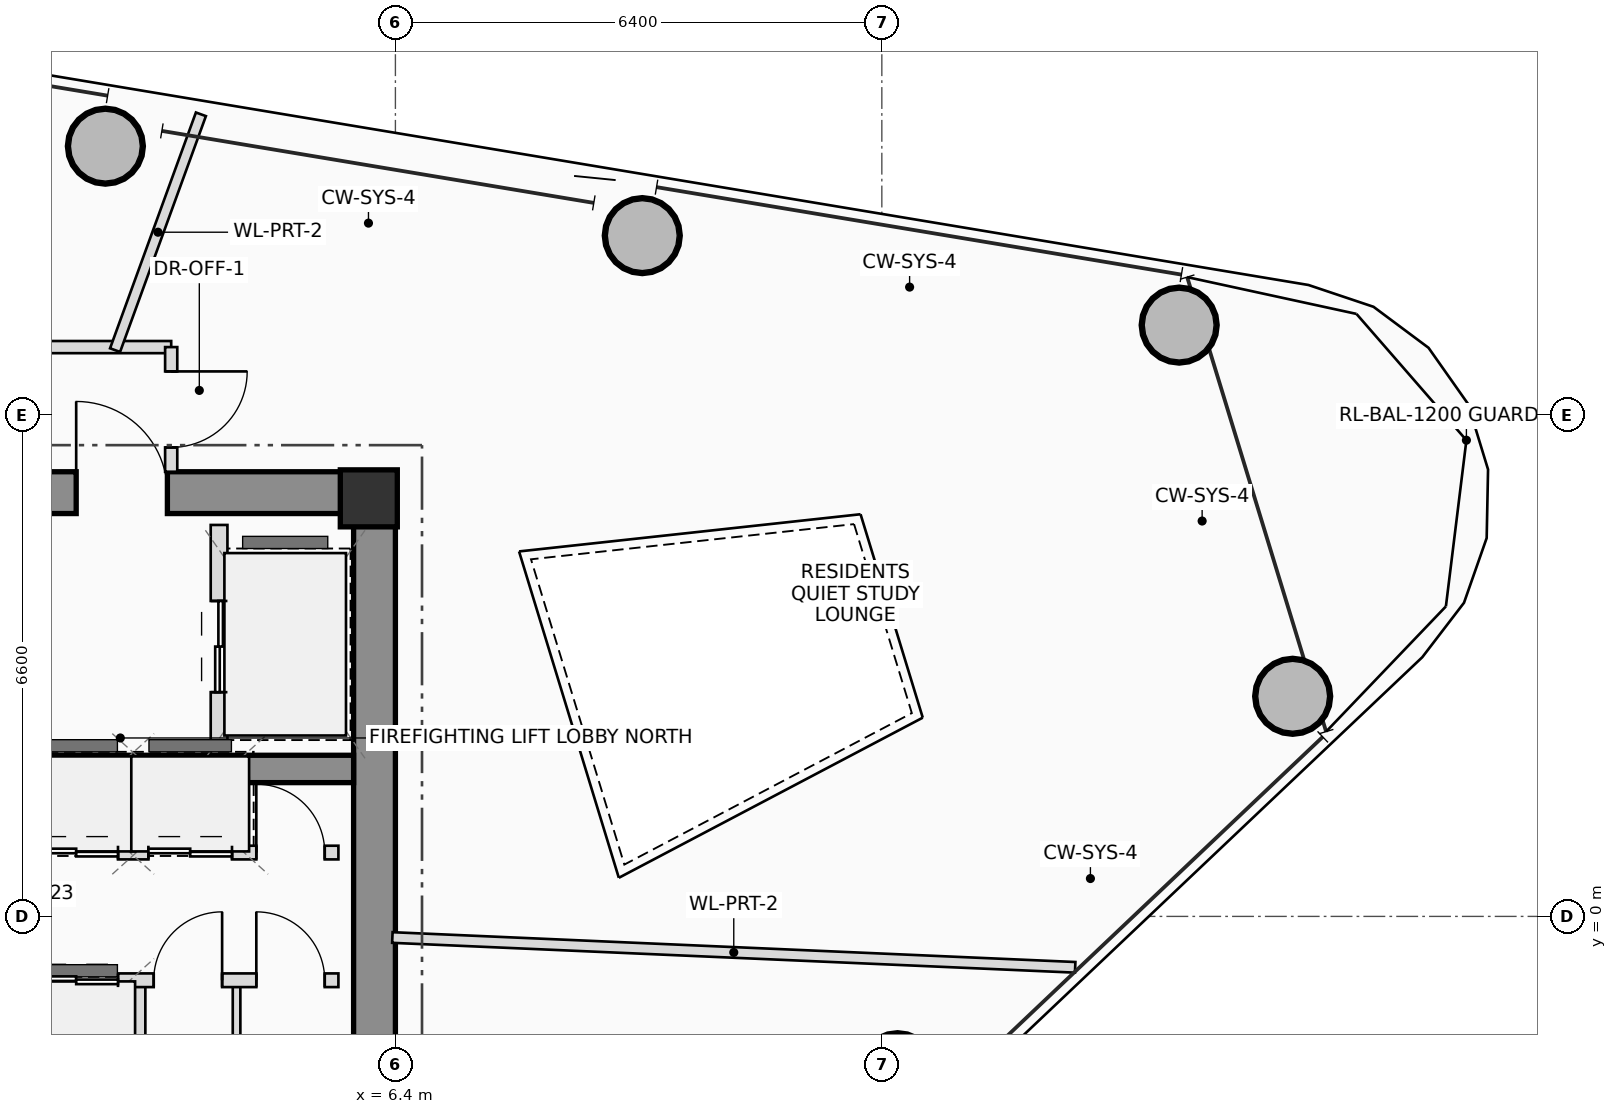
"""IFC4 building model, lengths in metres.
Left out: names, types, materials, properties, quantities, classifications, styles, units other than length and angle.
Written with IfcOpenShell. Run it as: python <this file> out.ifc"""

import sys

from ifc_helpers import new_model, si_unit, direction, frame, frame_2d, origin, origin_2d, place, context, subcontext, project, spatial, rectangle, hollow_circle, extrude, source, transform, mapped, element, fill, save


model = new_model("IFC4")
c1 = context("Model", 3, precision=1e-05, world=origin(), true_north=direction((0.0, 1.0)))
c2 = subcontext(c1, "Body", "Model", "MODEL_VIEW")
j1 = project(units=[si_unit("LENGTHUNIT", "METRE"), si_unit("PLANEANGLEUNIT", "RADIAN")], contexts=[c1])
p1 = place(None, origin())
s1 = spatial("IfcSite", under=j1, at=p1, CompositionType="ELEMENT")
p2 = place(p1, origin())
s2 = spatial("IfcBuilding", under=s1, at=p2, CompositionType="ELEMENT")
p3 = place(p2, frame((0.0, 0.0, 245.65)))
s3 = spatial("IfcBuildingStorey", under=s2, at=p3, CompositionType="ELEMENT", Elevation=245.65)
m1 = source(origin(), c2, "Body", "SweptSolid", [
    extrude(rectangle(XDim=0.75, YDim=0.75, at=origin_2d()), origin(), (0.0, 0.0, 1.0), 3.4),
])
p4 = place(p3, frame((6.05, 5.5, 0.0), z_axis=(0.0, 0.0, 1.0), x_axis=(1.0, 0.0, 0.0)))
e1 = element("IfcColumn", 1, at=p4, inside=s3, PredefinedType="COLUMN", context=c2, shape_type="MappedRepresentation", body=[
    mapped(m1, transform((0.0, 0.0, 0.0), scale=1.0)),
])
p5 = place(p3, frame((-6.4, 5.575, 0.0), z_axis=(0.0, 0.0, 1.0), x_axis=(1.0, 0.0, 0.0)))
e2 = element("IfcWall", 2, at=p5, inside=s3, PredefinedType="SHEAR", context=c2, shape_type="SweptSolid", body=[
    extrude(rectangle(XDim=12.8, YDim=0.55, at=frame_2d((6.4, 0.0))), origin(), (0.0, 0.0, 1.0), 3.4),
])
p6 = place(p5, frame((8.6, 0.0, 0.0)))
e3 = element("IfcOpeningElement", 3, at=p6, cuts=e2, PredefinedType="OPENING", context=c2, shape_type="SweptSolid", body=[
    extrude(rectangle(XDim=1.2, YDim=2.2, at=frame_2d((0.6, 1.1))), frame((0.0, 0.285, 0.0), z_axis=(0.0, -1.0, 0.0), x_axis=(1.0, 0.0, 0.0)), (0.0, 0.0, 1.0), 0.57),
])
p7 = place(p3, frame((6.125, -5.3, 0.0), z_axis=(0.0, 0.0, 1.0), x_axis=(0.0, 1.0, 0.0)))
e4 = element("IfcWall", 4, at=p7, inside=s3, PredefinedType="SHEAR", context=c2, shape_type="SweptSolid", body=[
    extrude(rectangle(XDim=10.6, YDim=0.55, at=frame_2d((5.3, 0.0))), origin(), (0.0, 0.0, 1.0), 3.4),
])
p8 = place(p3, frame((-5.85, 1.94, 0.0), z_axis=(0.0, 0.0, 1.0), x_axis=(1.0, 0.0, 0.0)))
e5 = element("IfcWall", 5, at=p8, inside=s3, PredefinedType="SHEAR", context=c2, shape_type="SweptSolid", body=[
    extrude(rectangle(XDim=11.7, YDim=0.36, at=frame_2d((5.85, 0.0))), origin(), (0.0, 0.0, 1.0), 3.4),
])
m2 = source(origin(), c2, "Body", "SweptSolid", [
    extrude(hollow_circle(Radius=0.5, WallThickness=0.04, at=origin_2d()), origin(), (0.0, 0.0, 1.0), 3.4),
])
for number, where, z_axis, x_axis in (
    (6, (13.007, -2.03, 0.0), (0.0, 0.0, 1.0), (1.0, 0.0, 0.0)),
    (7, (18.205, 2.896, 0.0), (0.0, 0.0, 1.0), (1.0, 0.0, 0.0)),
    (8, (16.712, 7.779, 0.0), (0.0, 0.0, 1.0), (1.0, 0.0, 0.0)),
    (9, (9.648, 8.957, 0.0), (0.0, 0.0, 1.0), (1.0, 0.0, 0.0)),
    (10, (2.584, 10.134, 0.0), (0.0, 0.0, 1.0), (1.0, 0.0, 0.0)),
):
    element("IfcColumn", number, at=place(p3, frame(where, z_axis=z_axis, x_axis=x_axis)), inside=s3, PredefinedType="COLUMN", context=c2, shape_type="MappedRepresentation", body=[
        mapped(m2, transform((0.0, 0.0, 0.0), scale=1.0)),
    ])
p9 = place(p3, frame((4.08, 2.2, 0.0), z_axis=(0.0, 0.0, 1.0), x_axis=(0.0, 1.0, 0.0)))
e11 = element("IfcWall", 11, at=p9, inside=s3, PredefinedType="PLUMBINGWALL", context=c2, shape_type="SweptSolid", body=[
    extrude(rectangle(XDim=2.95, YDim=0.22, at=frame_2d((1.475, 0.0))), origin(), (0.0, 0.0, 1.0), 3.2),
])
p10 = place(p9, frame((0.75, 0.0, 0.0)))
e12 = element("IfcOpeningElement", 12, at=p10, cuts=e11, PredefinedType="OPENING", context=c2, shape_type="SweptSolid", body=[
    extrude(rectangle(XDim=1.2, YDim=2.25, at=frame_2d((0.6, 1.125))), frame((0.0, 0.12, 0.0), z_axis=(0.0, -1.0, 0.0), x_axis=(1.0, 0.0, 0.0)), (0.0, 0.0, 1.0), 0.24),
])
for number, where, z_axis, x_axis in (
    (13, (3.02, 0.84, 0.0), (0.0, 0.0, 1.0), (0.0, 1.0, 0.0)),
    (14, (4.38, 0.84, 0.0), (0.0, 0.0, 1.0), (0.0, 1.0, 0.0)),
    (15, (3.02, -1.82, 0.0), (0.0, 0.0, 1.0), (0.0, 1.0, 0.0)),
):
    element("IfcWall", number, at=place(p3, frame(where, z_axis=z_axis, x_axis=x_axis)), inside=s3, PredefinedType="PLUMBINGWALL", context=c2, shape_type="SweptSolid", body=[
        extrude(rectangle(XDim=0.98, YDim=0.18, at=frame_2d((0.49, 0.0))), origin(), (0.0, 0.0, 1.0), 3.2),
    ])
p11 = place(p3, frame((4.31, -1.82, 0.0), z_axis=(0.0, 0.0, 1.0), x_axis=(0.0, 1.0, 0.0)))
e16 = element("IfcWall", 16, at=p11, inside=s3, PredefinedType="PARTITIONING", context=c2, shape_type="SweptSolid", body=[
    extrude(rectangle(XDim=0.98, YDim=0.1, at=frame_2d((0.49, 0.0))), origin(), (0.0, 0.0, 1.0), 3.2),
])
p12 = place(p3, frame((-5.68, 0.84, 0.0), z_axis=(0.0, 0.0, 1.0), x_axis=(1.0, 0.0, 0.0)))
e17 = element("IfcWall", 17, at=p12, inside=s3, PredefinedType="PLUMBINGWALL", context=c2, shape_type="SweptSolid", body=[
    extrude(rectangle(XDim=11.33, YDim=0.18, at=frame_2d((5.665, 0.0))), origin(), (0.0, 0.0, 1.0), 3.2),
])
p13 = place(p12, frame((1.39, 0.0, 0.0)))
e18 = element("IfcOpeningElement", 18, at=p13, cuts=e17, PredefinedType="OPENING", context=c2, shape_type="SweptSolid", body=[
    extrude(rectangle(XDim=0.92, YDim=2.1, at=frame_2d((0.46, 1.05))), frame((0.0, 0.1, 0.0), z_axis=(0.0, -1.0, 0.0), x_axis=(1.0, 0.0, 0.0)), (0.0, 0.0, 1.0), 0.2),
])
p14 = place(p12, frame((4.87, 0.0, 0.0)))
e19 = element("IfcOpeningElement", 19, at=p14, cuts=e17, PredefinedType="OPENING", context=c2, shape_type="SweptSolid", body=[
    extrude(rectangle(XDim=0.9, YDim=2.05, at=frame_2d((0.45, 1.025))), frame((0.0, 0.1, 0.0), z_axis=(0.0, -1.0, 0.0), x_axis=(1.0, 0.0, 0.0)), (0.0, 0.0, 1.0), 0.2),
])
p15 = place(p12, frame((7.33, 0.0, 0.0)))
e20 = element("IfcOpeningElement", 20, at=p15, cuts=e17, PredefinedType="OPENING", context=c2, shape_type="SweptSolid", body=[
    extrude(rectangle(XDim=1.1, YDim=2.2, at=frame_2d((0.55, 1.1))), frame((0.0, 0.1, 0.0), z_axis=(0.0, -1.0, 0.0), x_axis=(1.0, 0.0, 0.0)), (0.0, 0.0, 1.0), 0.2),
])
p16 = place(p12, frame((8.83, 0.0, 0.0)))
e21 = element("IfcOpeningElement", 21, at=p16, cuts=e17, PredefinedType="OPENING", context=c2, shape_type="SweptSolid", body=[
    extrude(rectangle(XDim=1.1, YDim=2.2, at=frame_2d((0.55, 1.1))), frame((0.0, 0.1, 0.0), z_axis=(0.0, -1.0, 0.0), x_axis=(1.0, 0.0, 0.0)), (0.0, 0.0, 1.0), 0.2),
])
p17 = place(p12, frame((10.25, 0.0, 0.0)))
e22 = element("IfcOpeningElement", 22, at=p17, cuts=e17, PredefinedType="OPENING", context=c2, shape_type="SweptSolid", body=[
    extrude(rectangle(XDim=0.9, YDim=2.05, at=frame_2d((0.45, 1.025))), frame((0.0, 0.1, 0.0), z_axis=(0.0, -1.0, 0.0), x_axis=(1.0, 0.0, 0.0)), (0.0, 0.0, 1.0), 0.2),
])
p18 = place(p3, frame((-5.68, -0.84, 0.0), z_axis=(0.0, 0.0, 1.0), x_axis=(1.0, 0.0, 0.0)))
e23 = element("IfcWall", 23, at=p18, inside=s3, PredefinedType="PLUMBINGWALL", context=c2, shape_type="SweptSolid", body=[
    extrude(rectangle(XDim=11.33, YDim=0.18, at=frame_2d((5.665, 0.0))), origin(), (0.0, 0.0, 1.0), 3.2),
])
p19 = place(p18, frame((1.88, 0.0, 0.0)))
e24 = element("IfcOpeningElement", 24, at=p19, cuts=e23, PredefinedType="OPENING", context=c2, shape_type="SweptSolid", body=[
    extrude(rectangle(XDim=0.9, YDim=2.05, at=frame_2d((0.45, 1.025))), frame((0.0, 0.1, 0.0), z_axis=(0.0, -1.0, 0.0), x_axis=(1.0, 0.0, 0.0)), (0.0, 0.0, 1.0), 0.2),
])
p20 = place(p18, frame((5.35, 0.0, 0.0)))
e25 = element("IfcOpeningElement", 25, at=p20, cuts=e23, PredefinedType="OPENING", context=c2, shape_type="SweptSolid", body=[
    extrude(rectangle(XDim=0.9, YDim=2.05, at=frame_2d((0.45, 1.025))), frame((0.0, 0.1, 0.0), z_axis=(0.0, -1.0, 0.0), x_axis=(1.0, 0.0, 0.0)), (0.0, 0.0, 1.0), 0.2),
])
p21 = place(p18, frame((7.33, 0.0, 0.0)))
e26 = element("IfcOpeningElement", 26, at=p21, cuts=e23, PredefinedType="OPENING", context=c2, shape_type="SweptSolid", body=[
    extrude(rectangle(XDim=1.1, YDim=2.2, at=frame_2d((0.55, 1.1))), frame((0.0, 0.1, 0.0), z_axis=(0.0, -1.0, 0.0), x_axis=(1.0, 0.0, 0.0)), (0.0, 0.0, 1.0), 0.2),
])
p22 = place(p18, frame((8.9, 0.0, 0.0)))
e27 = element("IfcOpeningElement", 27, at=p22, cuts=e23, PredefinedType="OPENING", context=c2, shape_type="SweptSolid", body=[
    extrude(rectangle(XDim=0.9, YDim=2.05, at=frame_2d((0.45, 1.025))), frame((0.0, 0.1, 0.0), z_axis=(0.0, -1.0, 0.0), x_axis=(1.0, 0.0, 0.0)), (0.0, 0.0, 1.0), 0.2),
])
p23 = place(p18, frame((10.25, 0.0, 0.0)))
e28 = element("IfcOpeningElement", 28, at=p23, cuts=e23, PredefinedType="OPENING", context=c2, shape_type="SweptSolid", body=[
    extrude(rectangle(XDim=0.9, YDim=2.05, at=frame_2d((0.45, 1.025))), frame((0.0, 0.1, 0.0), z_axis=(0.0, -1.0, 0.0), x_axis=(1.0, 0.0, 0.0)), (0.0, 0.0, 1.0), 0.2),
])
p24 = place(p3, frame((-6.36, 7.49, 0.0), z_axis=(0.0, 0.0, 1.0), x_axis=(1.0, 0.0, 0.0)))
e29 = element("IfcWall", 29, at=p24, inside=s3, PredefinedType="PARTITIONING", context=c2, shape_type="SweptSolid", body=[
    extrude(rectangle(XDim=9.81, YDim=0.16, at=frame_2d((4.905, 0.0))), origin(), (0.0, 0.0, 1.0), 2.605),
])
p25 = place(p24, frame((5.419, 0.0, 0.0)))
e30 = element("IfcOpeningElement", 30, at=p25, cuts=e29, PredefinedType="OPENING", context=c2, shape_type="SweptSolid", body=[
    extrude(rectangle(XDim=1.0, YDim=2.25, at=frame_2d((0.5, 1.125))), frame((0.0, 0.09, 0.0), z_axis=(0.0, -1.0, 0.0), x_axis=(1.0, 0.0, 0.0)), (0.0, 0.0, 1.0), 0.18),
])
p26 = place(p3, frame((3.45, 7.49, 0.0), z_axis=(0.0, 0.0, 1.0), x_axis=(0.0, -1.0, 0.0)))
e31 = element("IfcWall", 31, at=p26, inside=s3, PredefinedType="PARTITIONING", context=c2, shape_type="SweptSolid", body=[
    extrude(rectangle(XDim=1.64, YDim=0.16, at=frame_2d((0.82, 0.0))), origin(), (0.0, 0.0, 1.0), 3.2),
])
p27 = place(p26, frame((0.32, 0.0, 0.0)))
e32 = element("IfcOpeningElement", 32, at=p27, cuts=e31, PredefinedType="OPENING", context=c2, shape_type="SweptSolid", body=[
    extrude(rectangle(XDim=1.0, YDim=2.25, at=frame_2d((0.5, 1.125))), frame((0.0, 0.09, 0.0), z_axis=(0.0, -1.0, 0.0), x_axis=(1.0, 0.0, 0.0)), (0.0, 0.0, 1.0), 0.18),
])
p28 = place(p3, frame((6.36, -0.278, 0.0), z_axis=(0.0, 0.0, 1.0), x_axis=(0.99904773846, -0.043630451279, 0.0)))
e33 = element("IfcWall", 33, at=p28, inside=s3, PredefinedType="PARTITIONING", context=c2, shape_type="SweptSolid", body=[
    extrude(rectangle(XDim=8.992, YDim=0.14, at=frame_2d((4.496, 0.0))), origin(), (0.0, 0.0, 1.0), 2.605),
])
p29 = place(p3, frame((2.712, 7.45, 0.0), z_axis=(0.0, 0.0, 1.0), x_axis=(0.341974588874, 0.9397092, 0.0)))
e34 = element("IfcWall", 34, at=p29, inside=s3, PredefinedType="PARTITIONING", context=c2, shape_type="SweptSolid", body=[
    extrude(rectangle(XDim=3.302, YDim=0.14, at=frame_2d((1.651, 0.0))), origin(), (0.0, 0.0, 1.0), 2.605),
])
p30 = place(p6, origin())
e35 = element("IfcDoor", 35, at=p30, inside=s3, OperationType="SINGLE_SWING_LEFT", PredefinedType="DOOR", context=c2, shape_type="SweptSolid", body=[
    extrude(rectangle(XDim=1.2, YDim=2.2, at=frame_2d((0.6, 1.1))), frame((0.0, 0.025, 0.0), z_axis=(0.0, -1.0, 0.0), x_axis=(1.0, 0.0, 0.0)), (0.0, 0.0, 1.0), 0.05),
])
fill(e3, e35)
p31 = place(p10, origin())
e36 = element("IfcDoor", 36, at=p31, inside=s3, OperationType="DOUBLE_DOOR_SLIDING", PredefinedType="DOOR", context=c2, shape_type="SweptSolid", body=[
    extrude(rectangle(XDim=1.2, YDim=2.25, at=frame_2d((0.6, 1.125))), frame((0.0, 0.025, 0.0), z_axis=(0.0, -1.0, 0.0), x_axis=(1.0, 0.0, 0.0)), (0.0, 0.0, 1.0), 0.05),
])
fill(e12, e36)
p32 = place(p15, origin())
e37 = element("IfcDoor", 37, at=p32, inside=s3, OperationType="DOUBLE_DOOR_SLIDING", PredefinedType="DOOR", context=c2, shape_type="SweptSolid", body=[
    extrude(rectangle(XDim=1.1, YDim=2.2, at=frame_2d((0.55, 1.1))), frame((0.0, 0.025, 0.0), z_axis=(0.0, -1.0, 0.0), x_axis=(1.0, 0.0, 0.0)), (0.0, 0.0, 1.0), 0.05),
])
fill(e20, e37)
p33 = place(p16, origin())
e38 = element("IfcDoor", 38, at=p33, inside=s3, OperationType="DOUBLE_DOOR_SLIDING", PredefinedType="DOOR", context=c2, shape_type="SweptSolid", body=[
    extrude(rectangle(XDim=1.1, YDim=2.2, at=frame_2d((0.55, 1.1))), frame((0.0, 0.025, 0.0), z_axis=(0.0, -1.0, 0.0), x_axis=(1.0, 0.0, 0.0)), (0.0, 0.0, 1.0), 0.05),
])
fill(e21, e38)
p34 = place(p17, origin())
e39 = element("IfcDoor", 39, at=p34, inside=s3, OperationType="SINGLE_SWING_LEFT", PredefinedType="DOOR", context=c2, shape_type="SweptSolid", body=[
    extrude(rectangle(XDim=0.9, YDim=2.05, at=frame_2d((0.45, 1.025))), frame((0.0, 0.025, 0.0), z_axis=(0.0, -1.0, 0.0), x_axis=(1.0, 0.0, 0.0)), (0.0, 0.0, 1.0), 0.05),
])
fill(e22, e39)
p35 = place(p21, origin())
e40 = element("IfcDoor", 40, at=p35, inside=s3, OperationType="DOUBLE_DOOR_SLIDING", PredefinedType="DOOR", context=c2, shape_type="SweptSolid", body=[
    extrude(rectangle(XDim=1.1, YDim=2.2, at=frame_2d((0.55, 1.1))), frame((0.0, 0.025, 0.0), z_axis=(0.0, -1.0, 0.0), x_axis=(1.0, 0.0, 0.0)), (0.0, 0.0, 1.0), 0.05),
])
fill(e26, e40)
p36 = place(p22, origin())
e41 = element("IfcDoor", 41, at=p36, inside=s3, OperationType="SINGLE_SWING_RIGHT", PredefinedType="DOOR", context=c2, shape_type="SweptSolid", body=[
    extrude(rectangle(XDim=0.9, YDim=2.05, at=frame_2d((0.45, 1.025))), frame((0.0, 0.025, 0.0), z_axis=(0.0, -1.0, 0.0), x_axis=(1.0, 0.0, 0.0)), (0.0, 0.0, 1.0), 0.05),
])
fill(e27, e41)
p37 = place(p23, origin())
e42 = element("IfcDoor", 42, at=p37, inside=s3, OperationType="SINGLE_SWING_LEFT", PredefinedType="DOOR", context=c2, shape_type="SweptSolid", body=[
    extrude(rectangle(XDim=0.9, YDim=2.05, at=frame_2d((0.45, 1.025))), frame((0.0, 0.025, 0.0), z_axis=(0.0, -1.0, 0.0), x_axis=(1.0, 0.0, 0.0)), (0.0, 0.0, 1.0), 0.05),
])
fill(e28, e42)
p38 = place(p27, origin())
e43 = element("IfcDoor", 43, at=p38, inside=s3, OperationType="SINGLE_SWING_LEFT", PredefinedType="DOOR", context=c2, shape_type="SweptSolid", body=[
    extrude(rectangle(XDim=1.0, YDim=2.25, at=frame_2d((0.5, 1.125))), frame((0.0, 0.025, 0.0), z_axis=(0.0, -1.0, 0.0), x_axis=(1.0, 0.0, 0.0)), (0.0, 0.0, 1.0), 0.05),
])
fill(e32, e43)
save(model, sys.argv[1])
